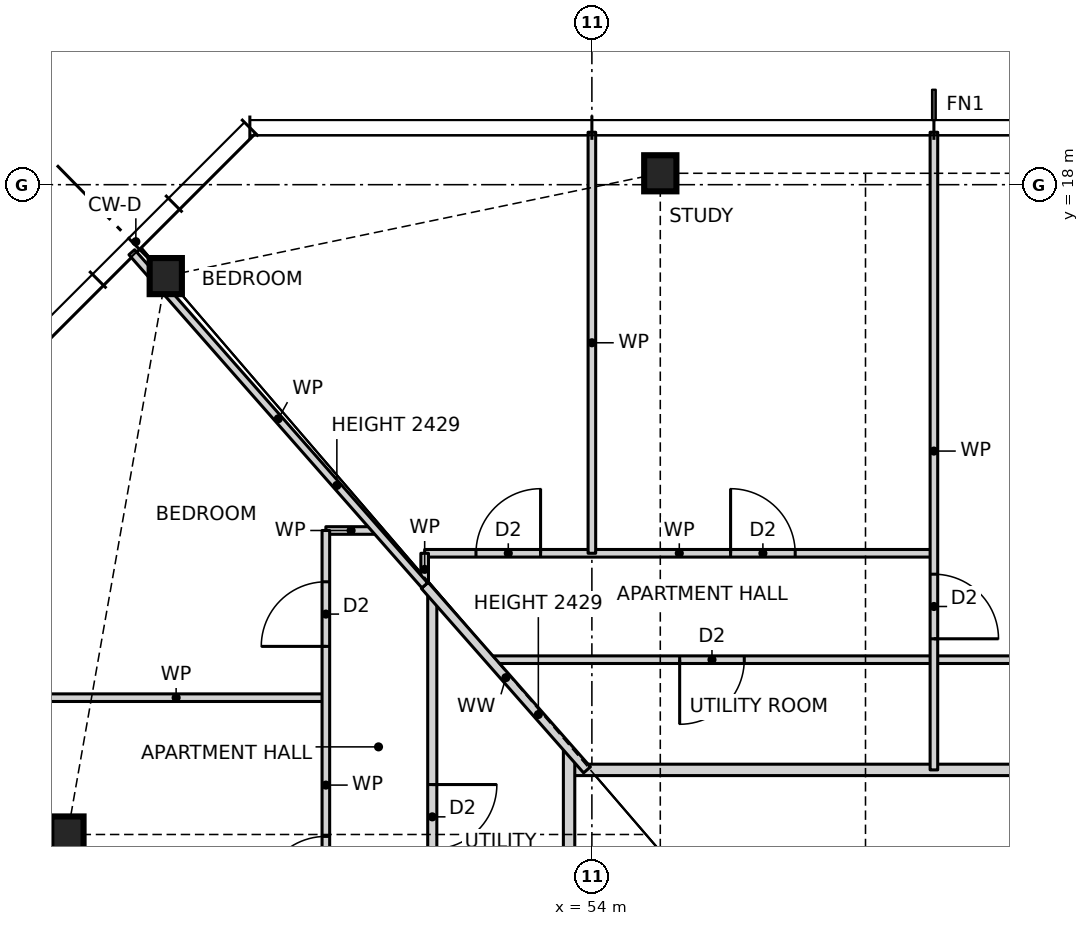
"""IFC4 building model, lengths in metres.
Left out: names, types, materials, properties, quantities, classifications, styles, units other than length and angle.
Written with IfcOpenShell. Run it as: python <this file> out.ifc"""

import sys

from ifc_helpers import new_model, si_unit, direction, frame, frame_2d, origin, origin_2d, place, context, subcontext, project, spatial, rectangle, i_section, extrude, element, fill, save


model = new_model("IFC4")
c1 = context("Model", 3, precision=1e-05, world=origin(), true_north=direction((0.0, 1.0)))
c2 = subcontext(c1, "Body", "Model", "MODEL_VIEW")
j1 = project(units=[si_unit("LENGTHUNIT", "METRE"), si_unit("PLANEANGLEUNIT", "RADIAN")], contexts=[c1])
p1 = place(None, origin())
s1 = spatial("IfcSite", under=j1, at=p1, CompositionType="ELEMENT")
p2 = place(p1, origin())
s2 = spatial("IfcBuilding", under=s1, at=p2, CompositionType="ELEMENT")
p3 = place(p2, frame((0.0, 0.0, 29.0)))
s3 = spatial("IfcBuildingStorey", under=s2, at=p3, CompositionType="ELEMENT", Elevation=29.0)
for number, where, z_axis, x_axis in (
    (1, (54.9, 18.15, 0.0), (0.0, 0.0, 1.0), (1.0, 0.0, 0.0)),
    (2, (48.394, 16.797, 0.0), (0.0, 0.0, 1.0), (1.0, 0.0, 0.0)),
    (3, (47.1, 9.45, 0.0), (0.0, 0.0, 1.0), (1.0, 0.0, 0.0)),
):
    element("IfcColumn", number, at=place(p3, frame(where, z_axis=z_axis, x_axis=x_axis)), inside=s3, PredefinedType="COLUMN", context=c2, shape_type="SweptSolid", body=[
        extrude(i_section(OverallWidth=0.424, OverallDepth=0.475, WebThickness=0.048, FlangeThickness=0.077, at=origin_2d()), origin(), (0.0, 0.0, 1.0), 3.5),
    ])
p4 = place(p3, frame((53.7, 10.3, 0.0), z_axis=(0.0, 0.0, 1.0), x_axis=(1.0, 0.0, 0.0)))
e4 = element("IfcWall", 4, at=p4, inside=s3, PredefinedType="PARTITIONING", context=c2, shape_type="SweptSolid", body=[
    extrude(rectangle(XDim=18.6, YDim=0.15, at=frame_2d((9.3, 0.0))), origin(), (0.0, 0.0, 1.0), 3.27),
])
p5 = place(p4, frame((8.3, 0.0, 0.0)))
e5 = element("IfcOpeningElement", 5, at=p5, cuts=e4, PredefinedType="OPENING", context=c2, shape_type="SweptSolid", body=[
    extrude(rectangle(XDim=1.0, YDim=2.1, at=frame_2d((0.5, 1.05))), frame((0.0, 0.085, 0.0), z_axis=(0.0, -1.0, 0.0), x_axis=(1.0, 0.0, 0.0)), (0.0, 0.0, 1.0), 0.17),
])
p6 = place(p3, frame((46.56, 11.25, 0.0), z_axis=(0.0, 0.0, 1.0), x_axis=(1.0, 0.0, 0.0)))
e6 = element("IfcWall", 6, at=p6, inside=s3, PredefinedType="PARTITIONING", context=c2, shape_type="SweptSolid", body=[
    extrude(rectangle(XDim=3.94, YDim=0.1, at=frame_2d((1.97, 0.0))), origin(), (0.0, 0.0, 1.0), 3.27),
])
p7 = place(p3, frame((52.66, 11.75, 0.0), z_axis=(0.0, 0.0, 1.0), x_axis=(1.0, 0.0, 0.0)))
e7 = element("IfcWall", 7, at=p7, inside=s3, PredefinedType="PARTITIONING", context=c2, shape_type="SweptSolid", body=[
    extrude(rectangle(XDim=20.68, YDim=0.1, at=frame_2d((10.34, 0.0))), origin(), (0.0, 0.0, 1.0), 3.27),
])
p8 = place(p7, frame((12.615, 0.0, 0.0)))
e8 = element("IfcOpeningElement", 8, at=p8, cuts=e7, PredefinedType="OPENING", context=c2, shape_type="SweptSolid", body=[
    extrude(rectangle(XDim=0.85, YDim=2.1, at=frame_2d((0.425, 1.05))), frame((0.0, 0.06, 0.0), z_axis=(0.0, -1.0, 0.0), x_axis=(1.0, 0.0, 0.0)), (0.0, 0.0, 1.0), 0.12),
])
p9 = place(p7, frame((9.415, 0.0, 0.0)))
e9 = element("IfcOpeningElement", 9, at=p9, cuts=e7, PredefinedType="OPENING", context=c2, shape_type="SweptSolid", body=[
    extrude(rectangle(XDim=0.85, YDim=2.1, at=frame_2d((0.425, 1.05))), frame((0.0, 0.06, 0.0), z_axis=(0.0, -1.0, 0.0), x_axis=(1.0, 0.0, 0.0)), (0.0, 0.0, 1.0), 0.12),
])
p10 = place(p7, frame((17.335, 0.0, 0.0)))
e10 = element("IfcOpeningElement", 10, at=p10, cuts=e7, PredefinedType="OPENING", context=c2, shape_type="SweptSolid", body=[
    extrude(rectangle(XDim=0.85, YDim=2.1, at=frame_2d((0.425, 1.05))), frame((0.0, 0.06, 0.0), z_axis=(0.0, -1.0, 0.0), x_axis=(1.0, 0.0, 0.0)), (0.0, 0.0, 1.0), 0.12),
])
p11 = place(p7, frame((2.495, 0.0, 0.0)))
e11 = element("IfcOpeningElement", 11, at=p11, cuts=e7, PredefinedType="OPENING", context=c2, shape_type="SweptSolid", body=[
    extrude(rectangle(XDim=0.85, YDim=2.1, at=frame_2d((0.425, 1.05))), frame((0.0, 0.06, 0.0), z_axis=(0.0, -1.0, 0.0), x_axis=(1.0, 0.0, 0.0)), (0.0, 0.0, 1.0), 0.12),
])
p12 = place(p3, frame((51.8, 13.15, 0.0), z_axis=(0.0, 0.0, 1.0), x_axis=(1.0, 0.0, 0.0)))
e12 = element("IfcWall", 12, at=p12, inside=s3, PredefinedType="PARTITIONING", context=c2, shape_type="SweptSolid", body=[
    extrude(rectangle(XDim=6.7, YDim=0.1, at=frame_2d((3.35, 0.0))), origin(), (0.0, 0.0, 1.0), 3.27),
])
p13 = place(p12, frame((4.025, 0.0, 0.0)))
e13 = element("IfcOpeningElement", 13, at=p13, cuts=e12, PredefinedType="OPENING", context=c2, shape_type="SweptSolid", body=[
    extrude(rectangle(XDim=0.85, YDim=2.1, at=frame_2d((0.425, 1.05))), frame((0.0, 0.06, 0.0), z_axis=(0.0, -1.0, 0.0), x_axis=(1.0, 0.0, 0.0)), (0.0, 0.0, 1.0), 0.12),
])
p14 = place(p12, frame((0.675, 0.0, 0.0)))
e14 = element("IfcOpeningElement", 14, at=p14, cuts=e12, PredefinedType="OPENING", context=c2, shape_type="SweptSolid", body=[
    extrude(rectangle(XDim=0.85, YDim=2.1, at=frame_2d((0.425, 1.05))), frame((0.0, 0.06, 0.0), z_axis=(0.0, -1.0, 0.0), x_axis=(1.0, 0.0, 0.0)), (0.0, 0.0, 1.0), 0.12),
])
p15 = place(p3, frame((50.5, 13.45, 0.0), z_axis=(0.0, 0.0, 1.0), x_axis=(1.0, 0.0, 0.0)))
e15 = element("IfcWall", 15, at=p15, inside=s3, PredefinedType="PARTITIONING", context=c2, shape_type="SweptSolid", body=[
    extrude(rectangle(XDim=0.664, YDim=0.1, at=frame_2d((0.332, 0.0))), origin(), (0.0, 0.0, 1.0), 3.27),
])
p16 = place(p3, frame((58.5, 10.3, 0.0), z_axis=(0.0, 0.0, 1.0), x_axis=(0.0, 1.0, 0.0)))
e16 = element("IfcWall", 16, at=p16, inside=s3, PredefinedType="PARTITIONING", context=c2, shape_type="SweptSolid", body=[
    extrude(rectangle(XDim=8.39, YDim=0.1, at=frame_2d((4.195, 0.0))), origin(), (0.0, 0.0, 1.0), 3.27),
])
p17 = place(p16, frame((1.725, 0.0, 0.0)))
e17 = element("IfcOpeningElement", 17, at=p17, cuts=e16, PredefinedType="OPENING", context=c2, shape_type="SweptSolid", body=[
    extrude(rectangle(XDim=0.85, YDim=2.1, at=frame_2d((0.425, 1.05))), frame((0.0, 0.06, 0.0), z_axis=(0.0, -1.0, 0.0), x_axis=(1.0, 0.0, 0.0)), (0.0, 0.0, 1.0), 0.12),
])
p18 = place(p3, frame((54.0, 13.15, 0.0), z_axis=(0.0, 0.0, 1.0), x_axis=(0.0, 1.0, 0.0)))
e18 = element("IfcWall", 18, at=p18, inside=s3, PredefinedType="PARTITIONING", context=c2, shape_type="SweptSolid", body=[
    extrude(rectangle(XDim=5.54, YDim=0.1, at=frame_2d((2.77, 0.0))), origin(), (0.0, 0.0, 1.0), 3.27),
])
p19 = place(p3, frame((53.7, -10.568, 0.0), z_axis=(0.0, 0.0, 1.0), x_axis=(0.0, 1.0, 0.0)))
e19 = element("IfcWall", 19, at=p19, inside=s3, PredefinedType="PARTITIONING", context=c2, shape_type="SweptSolid", body=[
    extrude(rectangle(XDim=21.136, YDim=0.15, at=frame_2d((10.568, 0.0))), origin(), (0.0, 0.0, 1.0), 3.27),
])
p20 = place(p19, frame((11.818, 0.0, 0.0)))
e20 = element("IfcOpeningElement", 20, at=p20, cuts=e19, PredefinedType="OPENING", context=c2, shape_type="SweptSolid", body=[
    extrude(rectangle(XDim=1.0, YDim=2.1, at=frame_2d((0.5, 1.05))), frame((0.0, 0.085, 0.0), z_axis=(0.0, -1.0, 0.0), x_axis=(1.0, 0.0, 0.0)), (0.0, 0.0, 1.0), 0.17),
])
p21 = place(p3, frame((51.9, -12.614, 0.0), z_axis=(0.0, 0.0, 1.0), x_axis=(0.0, 1.0, 0.0)))
e21 = element("IfcWall", 21, at=p21, inside=s3, PredefinedType="PARTITIONING", context=c2, shape_type="SweptSolid", body=[
    extrude(rectangle(XDim=25.228, YDim=0.12, at=frame_2d((12.614, 0.0))), origin(), (0.0, 0.0, 1.0), 3.27),
])
p22 = place(p21, frame((17.139, 0.0, 0.0)))
e22 = element("IfcOpeningElement", 22, at=p22, cuts=e21, PredefinedType="OPENING", context=c2, shape_type="SweptSolid", body=[
    extrude(rectangle(XDim=0.85, YDim=2.1, at=frame_2d((0.425, 1.05))), frame((0.0, 0.07, 0.0), z_axis=(0.0, -1.0, 0.0), x_axis=(1.0, 0.0, 0.0)), (0.0, 0.0, 1.0), 0.14),
])
p23 = place(p21, frame((13.939, 0.0, 0.0)))
e23 = element("IfcOpeningElement", 23, at=p23, cuts=e21, PredefinedType="OPENING", context=c2, shape_type="SweptSolid", body=[
    extrude(rectangle(XDim=0.85, YDim=2.1, at=frame_2d((0.425, 1.05))), frame((0.0, 0.07, 0.0), z_axis=(0.0, -1.0, 0.0), x_axis=(1.0, 0.0, 0.0)), (0.0, 0.0, 1.0), 0.14),
])
p24 = place(p21, frame((21.871, 0.0, 0.0)))
e24 = element("IfcOpeningElement", 24, at=p24, cuts=e21, PredefinedType="OPENING", context=c2, shape_type="SweptSolid", body=[
    extrude(rectangle(XDim=0.85, YDim=2.1, at=frame_2d((0.425, 1.05))), frame((0.0, 0.07, 0.0), z_axis=(0.0, -1.0, 0.0), x_axis=(1.0, 0.0, 0.0)), (0.0, 0.0, 1.0), 0.14),
])
p25 = place(p21, frame((7.739, 0.0, 0.0)))
e25 = element("IfcOpeningElement", 25, at=p25, cuts=e21, PredefinedType="OPENING", context=c2, shape_type="SweptSolid", body=[
    extrude(rectangle(XDim=0.85, YDim=2.1, at=frame_2d((0.425, 1.05))), frame((0.0, 0.07, 0.0), z_axis=(0.0, -1.0, 0.0), x_axis=(1.0, 0.0, 0.0)), (0.0, 0.0, 1.0), 0.14),
])
p26 = place(p21, frame((2.557, 0.0, 0.0)))
e26 = element("IfcOpeningElement", 26, at=p26, cuts=e21, PredefinedType="OPENING", context=c2, shape_type="SweptSolid", body=[
    extrude(rectangle(XDim=0.85, YDim=2.1, at=frame_2d((0.425, 1.05))), frame((0.0, 0.07, 0.0), z_axis=(0.0, -1.0, 0.0), x_axis=(1.0, 0.0, 0.0)), (0.0, 0.0, 1.0), 0.14),
])
p27 = place(p3, frame((51.8, 12.727, 0.0), z_axis=(0.0, 0.0, 1.0), x_axis=(0.0, 1.0, 0.0)))
e27 = element("IfcWall", 27, at=p27, inside=s3, PredefinedType="PARTITIONING", context=c2, shape_type="SweptSolid", body=[
    extrude(rectangle(XDim=0.423, YDim=0.1, at=frame_2d((0.211, 0.0))), origin(), (0.0, 0.0, 1.0), 3.27),
])
p28 = place(p3, frame((50.5, 6.75, 0.0), z_axis=(0.0, 0.0, 1.0), x_axis=(0.0, 1.0, 0.0)))
e28 = element("IfcWall", 28, at=p28, inside=s3, PredefinedType="PARTITIONING", context=c2, shape_type="SweptSolid", body=[
    extrude(rectangle(XDim=6.7, YDim=0.1, at=frame_2d((3.35, 0.0))), origin(), (0.0, 0.0, 1.0), 3.27),
])
p29 = place(p28, frame((1.825, 0.0, 0.0)))
e29 = element("IfcOpeningElement", 29, at=p29, cuts=e28, PredefinedType="OPENING", context=c2, shape_type="SweptSolid", body=[
    extrude(rectangle(XDim=0.85, YDim=2.1, at=frame_2d((0.425, 1.05))), frame((0.0, 0.06, 0.0), z_axis=(0.0, -1.0, 0.0), x_axis=(1.0, 0.0, 0.0)), (0.0, 0.0, 1.0), 0.12),
])
p30 = place(p28, frame((5.175, 0.0, 0.0)))
e30 = element("IfcOpeningElement", 30, at=p30, cuts=e28, PredefinedType="OPENING", context=c2, shape_type="SweptSolid", body=[
    extrude(rectangle(XDim=0.85, YDim=2.1, at=frame_2d((0.425, 1.05))), frame((0.0, 0.06, 0.0), z_axis=(0.0, -1.0, 0.0), x_axis=(1.0, 0.0, 0.0)), (0.0, 0.0, 1.0), 0.12),
])
p31 = place(p3, frame((53.936, 10.3, 0.0), z_axis=(0.0, 0.0, 1.0), x_axis=(-0.660384426006, 0.750927699508, 0.0)))
e31 = element("IfcWall", 31, at=p31, inside=s3, PredefinedType="PARTITIONING", context=c2, shape_type="SweptSolid", body=[
    extrude(rectangle(XDim=3.233, YDim=0.12, at=frame_2d((1.616, 0.0))), origin(), (0.0, 0.0, 1.0), 2.429),
])
p32 = place(p3, frame((51.801, 12.728, 0.0), z_axis=(0.0, 0.0, 1.0), x_axis=(-0.660356300202, 0.750952433103, 0.0)))
e32 = element("IfcWall", 32, at=p32, inside=s3, PredefinedType="PARTITIONING", context=c2, shape_type="SweptSolid", body=[
    extrude(rectangle(XDim=5.837, YDim=0.1, at=frame_2d((2.918, 0.0))), origin(), (0.0, 0.0, 1.0), 2.429),
])
p33 = place(p17, frame((0.85, 0.0, 0.0), z_axis=(0.0, 0.0, 1.0), x_axis=(-1.0, 0.0, 0.0)))
e33 = element("IfcDoor", 33, at=p33, inside=s3, OperationType="SINGLE_SWING_RIGHT", PredefinedType="DOOR", context=c2, shape_type="SweptSolid", body=[
    extrude(rectangle(XDim=0.85, YDim=2.1, at=frame_2d((0.425, 1.05))), frame((0.0, 0.025, 0.0), z_axis=(0.0, -1.0, 0.0), x_axis=(1.0, 0.0, 0.0)), (0.0, 0.0, 1.0), 0.05),
])
fill(e17, e33)
p34 = place(p13, origin())
e34 = element("IfcDoor", 34, at=p34, inside=s3, OperationType="SINGLE_SWING_LEFT", PredefinedType="DOOR", context=c2, shape_type="SweptSolid", body=[
    extrude(rectangle(XDim=0.85, YDim=2.1, at=frame_2d((0.425, 1.05))), frame((0.0, 0.025, 0.0), z_axis=(0.0, -1.0, 0.0), x_axis=(1.0, 0.0, 0.0)), (0.0, 0.0, 1.0), 0.05),
])
fill(e13, e34)
p35 = place(p14, origin())
e35 = element("IfcDoor", 35, at=p35, inside=s3, OperationType="SINGLE_SWING_RIGHT", PredefinedType="DOOR", context=c2, shape_type="SweptSolid", body=[
    extrude(rectangle(XDim=0.85, YDim=2.1, at=frame_2d((0.425, 1.05))), frame((0.0, 0.025, 0.0), z_axis=(0.0, -1.0, 0.0), x_axis=(1.0, 0.0, 0.0)), (0.0, 0.0, 1.0), 0.05),
])
fill(e14, e35)
p36 = place(p11, frame((0.85, 0.0, 0.0), z_axis=(0.0, 0.0, 1.0), x_axis=(-1.0, 0.0, 0.0)))
e36 = element("IfcDoor", 36, at=p36, inside=s3, OperationType="SINGLE_SWING_RIGHT", PredefinedType="DOOR", context=c2, shape_type="SweptSolid", body=[
    extrude(rectangle(XDim=0.85, YDim=2.1, at=frame_2d((0.425, 1.05))), frame((0.0, 0.025, 0.0), z_axis=(0.0, -1.0, 0.0), x_axis=(1.0, 0.0, 0.0)), (0.0, 0.0, 1.0), 0.05),
])
fill(e11, e36)
p37 = place(p29, origin())
e37 = element("IfcDoor", 37, at=p37, inside=s3, OperationType="SINGLE_SWING_LEFT", PredefinedType="DOOR", context=c2, shape_type="SweptSolid", body=[
    extrude(rectangle(XDim=0.85, YDim=2.1, at=frame_2d((0.425, 1.05))), frame((0.0, 0.025, 0.0), z_axis=(0.0, -1.0, 0.0), x_axis=(1.0, 0.0, 0.0)), (0.0, 0.0, 1.0), 0.05),
])
fill(e29, e37)
p38 = place(p30, origin())
e38 = element("IfcDoor", 38, at=p38, inside=s3, OperationType="SINGLE_SWING_LEFT", PredefinedType="DOOR", context=c2, shape_type="SweptSolid", body=[
    extrude(rectangle(XDim=0.85, YDim=2.1, at=frame_2d((0.425, 1.05))), frame((0.0, 0.025, 0.0), z_axis=(0.0, -1.0, 0.0), x_axis=(1.0, 0.0, 0.0)), (0.0, 0.0, 1.0), 0.05),
])
fill(e30, e38)
p39 = place(p24, frame((0.85, 0.0, 0.0), z_axis=(0.0, 0.0, 1.0), x_axis=(-1.0, 0.0, 0.0)))
e39 = element("IfcDoor", 39, at=p39, inside=s3, OperationType="SINGLE_SWING_LEFT", PredefinedType="DOOR", context=c2, shape_type="SweptSolid", body=[
    extrude(rectangle(XDim=0.85, YDim=2.1, at=frame_2d((0.425, 1.05))), frame((0.0, 0.025, 0.0), z_axis=(0.0, -1.0, 0.0), x_axis=(1.0, 0.0, 0.0)), (0.0, 0.0, 1.0), 0.05),
])
fill(e24, e39)
save(model, sys.argv[1])
